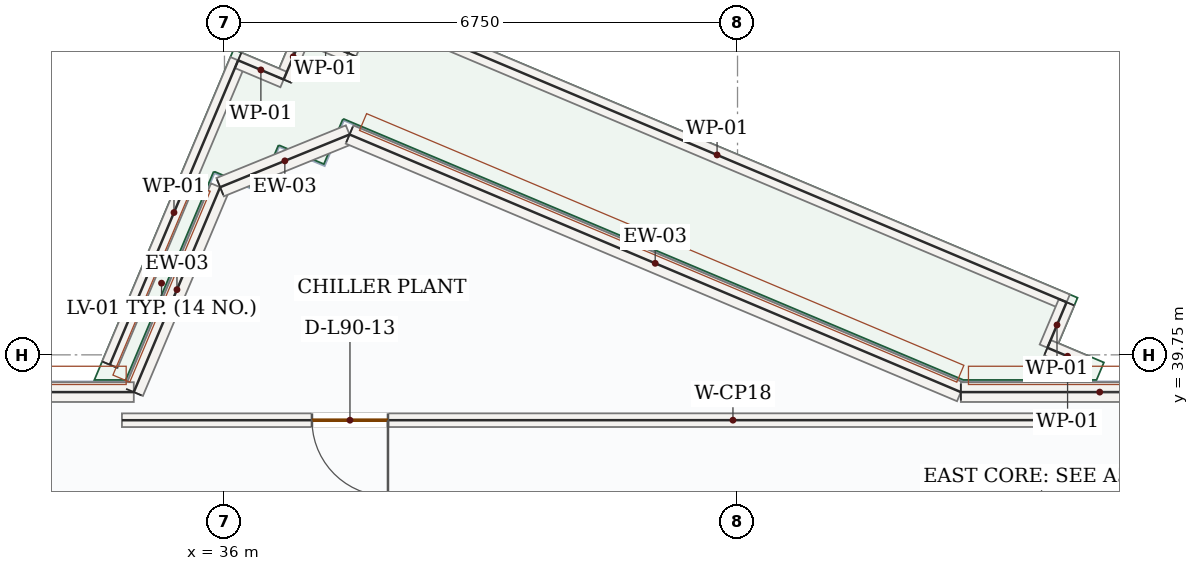
"""IFC4 building model, lengths in metres.
Left out: names, types, materials, properties, quantities, classifications, styles, units other than length and angle.
Written with IfcOpenShell. Run it as: python <this file> out.ifc"""

import sys

from ifc_helpers import new_model, si_unit, direction, frame, frame_2d, origin, place, context, subcontext, project, spatial, rectangle, extrude, source, transform, mapped, element, fill, save


model = new_model("IFC4")
c1 = context("Model", 3, precision=1e-05, world=origin(), true_north=direction((0.0, 1.0)))
c2 = subcontext(c1, "Body", "Model", "MODEL_VIEW")
j1 = project(units=[si_unit("LENGTHUNIT", "METRE"), si_unit("PLANEANGLEUNIT", "RADIAN")], contexts=[c1])
p1 = place(None, origin())
s1 = spatial("IfcSite", under=j1, at=p1, CompositionType="ELEMENT")
p2 = place(p1, origin())
s2 = spatial("IfcBuilding", under=s1, at=p2, CompositionType="ELEMENT")
p3 = place(p2, frame((0.0, 0.0, 370.65)))
s3 = spatial("IfcBuildingStorey", under=s2, at=p3, CompositionType="ELEMENT", Elevation=370.65)
m1 = source(origin(), c2, "Body", "SweptSolid", [
    extrude(rectangle(XDim=0.65, YDim=0.22, at=frame_2d((0.325, 0.0))), origin(), (0.0, 0.0, 1.0), 1.2),
])
p4 = place(p3, frame((36.779, 43.372, 0.0), z_axis=(0.0, 0.0, 1.0), x_axis=(0.388292021409, 0.921536383498, 0.0)))
e1 = element("IfcWall", 1, at=p4, inside=s3, PredefinedType="PARAPET", context=c2, shape_type="MappedRepresentation", body=[
    mapped(m1, transform((0.0, 0.0, 0.0), x_axis=(1.0, 0.0, 0.0), y_axis=(0.0, 1.0, 0.0), z_axis=(0.0, 0.0, 1.0), scale=1.0)),
])
m2 = source(origin(), c2, "Body", "SweptSolid", [
    extrude(rectangle(XDim=0.65, YDim=0.22, at=frame_2d((0.325, 0.0))), origin(), (0.0, 0.0, 1.0), 1.2),
])
for number, where, z_axis, x_axis in (
    (2, (37.031, 43.971, 0.0), (0.0, 0.0, 1.0), (0.921, -0.388, 0.0)),
    (3, (37.63, 43.719, 0.0), (0.0, 0.0, 1.0), (0.388, 0.921, 0.0)),
):
    element("IfcWall", number, at=place(p3, frame(where, z_axis=z_axis, x_axis=x_axis)), inside=s3, PredefinedType="PARAPET", context=c2, shape_type="MappedRepresentation", body=[
        mapped(m2, transform((0.0, 0.0, 0.0), x_axis=(1.0, 0.0, 0.0), y_axis=(0.0, 1.0, 0.0), z_axis=(0.0, 0.0, 1.0), scale=1.0)),
    ])
m3 = source(origin(), c2, "Body", "SweptSolid", [
    extrude(rectangle(XDim=9.98, YDim=0.22, at=frame_2d((4.99, 0.0))), origin(), (0.0, 0.0, 1.0), 1.2),
])
p5 = place(p3, frame((37.883, 44.318, 0.0), z_axis=(0.0, 0.0, 1.0), x_axis=(0.921534500121, -0.388296491211, 0.0)))
e4 = element("IfcWall", 4, at=p5, inside=s3, PredefinedType="PARAPET", context=c2, shape_type="MappedRepresentation", body=[
    mapped(m3, transform((0.0, 0.0, 0.0), x_axis=(1.0, 0.0, 0.0), y_axis=(0.0, 1.0, 0.0), z_axis=(0.0, 0.0, 1.0), scale=1.0)),
])
p6 = place(p3, frame((47.08, 40.443, 0.0), z_axis=(0.0, 0.0, 1.0), x_axis=(-0.388610857807, -0.921401975901, 0.0)))
e5 = element("IfcWall", 5, at=p6, inside=s3, PredefinedType="PARAPET", context=c2, shape_type="MappedRepresentation", body=[
    mapped(m1, transform((0.0, 0.0, 0.0), x_axis=(1.0, 0.0, 0.0), y_axis=(0.0, 1.0, 0.0), z_axis=(0.0, 0.0, 1.0), scale=1.0)),
])
m4 = source(origin(), c2, "Body", "SweptSolid", [
    extrude(rectangle(XDim=0.576, YDim=0.22, at=frame_2d((0.288, 0.0))), origin(), (0.0, 0.0, 1.0), 1.2),
])
p7 = place(p3, frame((46.827, 39.844, 0.0), z_axis=(0.0, 0.0, 1.0), x_axis=(0.921627391381, -0.388075960936, 0.0)))
e6 = element("IfcWall", 6, at=p7, inside=s3, PredefinedType="PARAPET", context=c2, shape_type="MappedRepresentation", body=[
    mapped(m4, transform((0.0, 0.0, 0.0), x_axis=(1.0, 0.0, 0.0), y_axis=(0.0, 1.0, 0.0), z_axis=(0.0, 0.0, 1.0), scale=1.0)),
])
m5 = source(origin(), c2, "Body", "SweptSolid", [
    extrude(rectangle(XDim=4.346, YDim=0.22, at=frame_2d((2.173, 0.0))), origin(), (0.0, 0.0, 1.0), 1.2),
])
p8 = place(p3, frame((34.492, 39.62, 0.0), z_axis=(0.0, 0.0, 1.0), x_axis=(0.38836589704, 0.9215052523, 0.0)))
e7 = element("IfcWall", 7, at=p8, inside=s3, PredefinedType="PARAPET", context=c2, shape_type="MappedRepresentation", body=[
    mapped(m5, transform((0.0, 0.0, 0.0), x_axis=(1.0, 0.0, 0.0), y_axis=(0.0, 1.0, 0.0), z_axis=(0.0, 0.0, 1.0), scale=1.0)),
])
p9 = place(p3, frame((36.18, 43.625, 0.0), z_axis=(0.0, 0.0, 1.0), x_axis=(0.921479736051, -0.388426435824, 0.0)))
e8 = element("IfcWall", 8, at=p9, inside=s3, PredefinedType="PARAPET", context=c2, shape_type="MappedRepresentation", body=[
    mapped(m2, transform((0.0, 0.0, 0.0), x_axis=(1.0, 0.0, 0.0), y_axis=(0.0, 1.0, 0.0), z_axis=(0.0, 0.0, 1.0), scale=1.0)),
])
m6 = source(origin(), c2, "Body", "SweptSolid", [
    extrude(rectangle(XDim=2.925, YDim=0.26, at=frame_2d((1.463, 0.0))), origin(), (0.0, 0.0, 1.0), 4.25),
])
p10 = place(p3, frame((34.807, 39.26, 0.0), z_axis=(0.0, 0.0, 1.0), x_axis=(0.388321883953, 0.921523800259, 0.0)))
e9 = element("IfcWall", 9, at=p10, inside=s3, PredefinedType="SOLIDWALL", context=c2, shape_type="MappedRepresentation", body=[
    mapped(m6, transform((0.0, 0.0, 0.0), x_axis=(1.0, 0.0, 0.0), y_axis=(0.0, 1.0, 0.0), z_axis=(0.0, 0.0, 1.0), scale=1.0)),
])
m7 = source(origin(), c2, "Body", "SweptSolid", [
    extrude(rectangle(XDim=1.839, YDim=0.26, at=frame_2d((0.919, 0.0))), origin(), (0.0, 0.0, 1.0), 4.25),
])
p11 = place(p3, frame((35.943, 41.956, 0.0), z_axis=(0.0, 0.0, 1.0), x_axis=(0.926216039781, 0.376993166586, 0.0)))
e10 = element("IfcWall", 10, at=p11, inside=s3, PredefinedType="SOLIDWALL", context=c2, shape_type="MappedRepresentation", body=[
    mapped(m7, transform((0.0, 0.0, 0.0), x_axis=(1.0, 0.0, 0.0), y_axis=(0.0, 1.0, 0.0), z_axis=(0.0, 0.0, 1.0), scale=1.0)),
])
m8 = source(origin(), c2, "Body", "SweptSolid", [
    extrude(rectangle(XDim=8.727, YDim=0.26, at=frame_2d((4.364, 0.0))), origin(), (0.0, 0.0, 1.0), 4.25),
])
p12 = place(p3, frame((37.646, 42.649, 0.0), z_axis=(0.0, 0.0, 1.0), x_axis=(0.921524227272, -0.38832087061, 0.0)))
e11 = element("IfcWall", 11, at=p12, inside=s3, PredefinedType="SOLIDWALL", context=c2, shape_type="MappedRepresentation", body=[
    mapped(m8, transform((0.0, 0.0, 0.0), x_axis=(1.0, 0.0, 0.0), y_axis=(0.0, 1.0, 0.0), z_axis=(0.0, 0.0, 1.0), scale=1.0)),
])
m9 = source(origin(), c2, "Body", "SweptSolid", [
    extrude(rectangle(XDim=3.654, YDim=0.26, at=frame_2d((1.827, 0.0))), origin(), (0.0, 0.0, 1.0), 4.25),
])
p13 = place(p3, frame((45.688, 39.26, 0.0), z_axis=(0.0, 0.0, 1.0), x_axis=(1.0, 0.0, 0.0)))
e12 = element("IfcWall", 12, at=p13, inside=s3, PredefinedType="SOLIDWALL", context=c2, shape_type="MappedRepresentation", body=[
    mapped(m9, transform((0.0, 0.0, 0.0), x_axis=(1.0, 0.0, 0.0), y_axis=(0.0, 1.0, 0.0), z_axis=(0.0, 0.0, 1.0), scale=1.0)),
])
m10 = source(origin(), c2, "Body", "SweptSolid", [
    extrude(rectangle(XDim=12.149, YDim=0.26, at=frame_2d((6.075, 0.0))), origin(), (0.0, 0.0, 1.0), 4.25),
])
p14 = place(p3, frame((22.658, 39.26, 0.0), z_axis=(0.0, 0.0, 1.0), x_axis=(1.0, 0.0, 0.0)))
e13 = element("IfcWall", 13, at=p14, inside=s3, PredefinedType="SOLIDWALL", context=c2, shape_type="MappedRepresentation", body=[
    mapped(m10, transform((0.0, 0.0, 0.0), x_axis=(1.0, 0.0, 0.0), y_axis=(0.0, 1.0, 0.0), z_axis=(0.0, 0.0, 1.0), scale=1.0)),
])
p15 = place(p3, frame((47.079, 38.891, 0.0), z_axis=(0.0, 0.0, 1.0), x_axis=(-0.999999995176, -9.8227967e-05, 0.0)))
e14 = element("IfcWall", 14, at=p15, inside=s3, PredefinedType="PARTITIONING", context=c2, shape_type="SweptSolid", body=[
    extrude(rectangle(XDim=12.427, YDim=0.18, at=frame_2d((6.214, 0.0))), origin(), (0.0, 0.0, 1.0), 4.25),
])
p16 = place(p15, frame((8.927, 0.0, 0.0)))
e15 = element("IfcOpeningElement", 15, at=p16, cuts=e14, PredefinedType="OPENING", context=c2, shape_type="SweptSolid", body=[
    extrude(rectangle(XDim=1.0, YDim=2.15, at=frame_2d((0.5, 1.075))), frame((0.0, 0.1, 0.0), z_axis=(0.0, -1.0, 0.0), x_axis=(1.0, 0.0, 0.0)), (0.0, 0.0, 1.0), 0.2),
])
m11 = source(origin(), c2, "Body", "SweptSolid", [
    extrude(rectangle(XDim=1.0, YDim=2.15, at=frame_2d((0.5, 1.075))), frame((0.0, 0.025, 0.0), z_axis=(0.0, -1.0, 0.0), x_axis=(1.0, 0.0, 0.0)), (0.0, 0.0, 1.0), 0.05),
])
p17 = place(p16, origin())
e16 = element("IfcDoor", 16, at=p17, inside=s3, OperationType="SINGLE_SWING_LEFT", PredefinedType="DOOR", context=c2, shape_type="MappedRepresentation", body=[
    mapped(m11, transform((0.0, 0.0, 0.0), x_axis=(1.0, 0.0, 0.0), y_axis=(0.0, 1.0, 0.0), z_axis=(0.0, 0.0, 1.0), scale=1.0)),
])
fill(e15, e16)
save(model, sys.argv[1])
